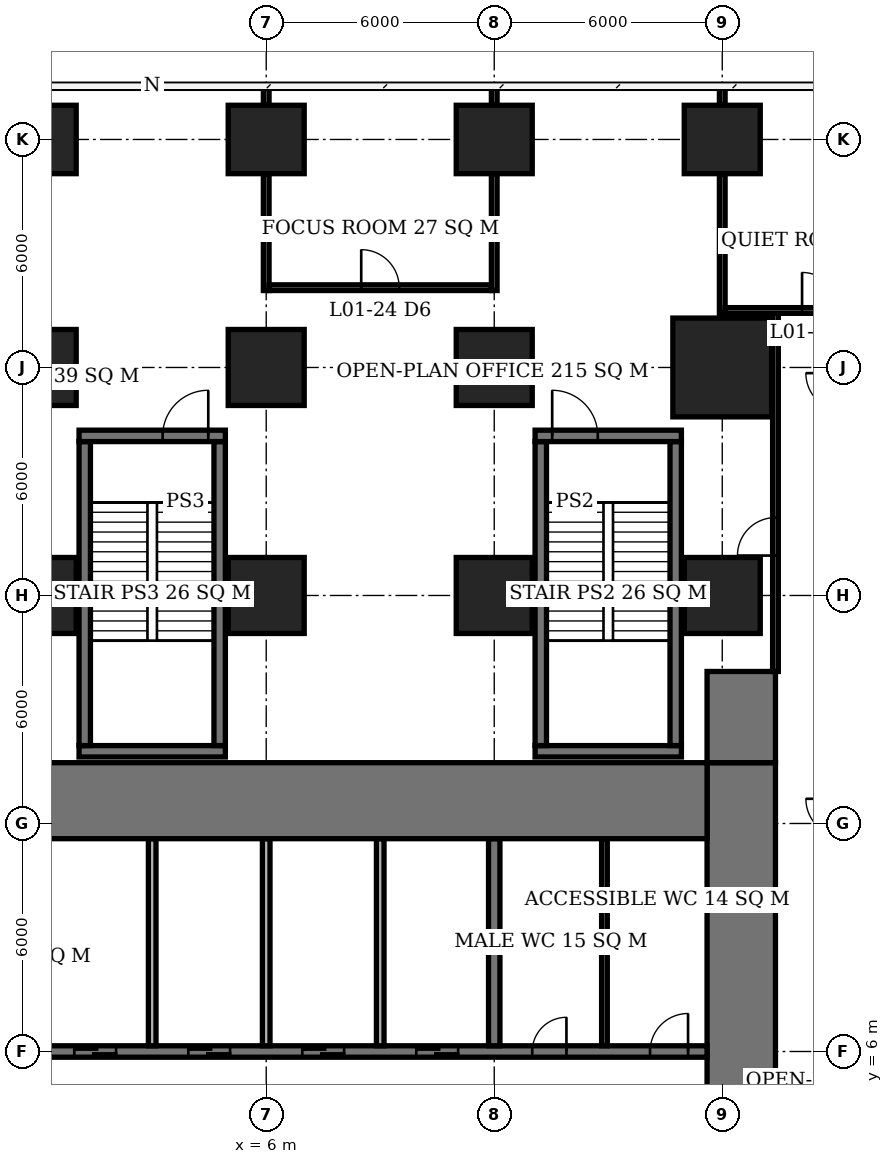
"""IFC4 building model, lengths in metres.
Left out: names, types, materials, properties, quantities, classifications, styles, units other than length and angle.
Written with IfcOpenShell. Run it as: python <this file> out.ifc"""

import sys

from ifc_helpers import new_model, si_unit, direction, frame, frame_2d, origin, origin_2d, place, context, subcontext, project, spatial, rectangle, extrude, element, fill, save


model = new_model("IFC4")
c1 = context("Model", 3, precision=1e-05, world=origin(), true_north=direction((0.0, 1.0)))
c2 = subcontext(c1, "Body", "Model", "MODEL_VIEW")
j1 = project(units=[si_unit("LENGTHUNIT", "METRE"), si_unit("PLANEANGLEUNIT", "RADIAN")], contexts=[c1])
p1 = place(None, origin())
s1 = spatial("IfcSite", under=j1, at=p1, CompositionType="ELEMENT")
p2 = place(p1, origin())
s2 = spatial("IfcBuilding", under=s1, at=p2, CompositionType="ELEMENT")
p3 = place(p2, frame((0.0, 0.0, 6.0)))
s3 = spatial("IfcBuildingStorey", under=s2, at=p3, CompositionType="ELEMENT", Elevation=6.0)
for number, where, z_axis, x_axis in (
    (1, (0.0, 18.0, 0.0), (0.0, 0.0, 1.0), (1.0, 0.0, 0.0)),
    (2, (0.0, 24.0, 0.0), (0.0, 0.0, 1.0), (1.0, 0.0, 0.0)),
):
    element("IfcColumn", number, at=place(p3, frame(where, z_axis=z_axis, x_axis=x_axis)), inside=s3, PredefinedType="COLUMN", context=c2, shape_type="SweptSolid", body=[
        extrude(rectangle(XDim=2.0, YDim=2.0, at=origin_2d()), origin(), (0.0, 0.0, 1.0), 5.0),
    ])
p4 = place(p3, frame((0.0, 30.0, 0.0), z_axis=(0.0, 0.0, 1.0), x_axis=(1.0, 0.0, 0.0)))
e3 = element("IfcColumn", 3, at=p4, inside=s3, PredefinedType="COLUMN", context=c2, shape_type="SweptSolid", body=[
    extrude(rectangle(XDim=2.0, YDim=1.8, at=origin_2d()), origin(), (0.0, 0.0, 1.0), 5.0),
])
for number, where, z_axis, x_axis in (
    (4, (6.0, 18.0, 0.0), (0.0, 0.0, 1.0), (1.0, 0.0, 0.0)),
    (5, (6.0, 24.0, 0.0), (0.0, 0.0, 1.0), (1.0, 0.0, 0.0)),
):
    element("IfcColumn", number, at=place(p3, frame(where, z_axis=z_axis, x_axis=x_axis)), inside=s3, PredefinedType="COLUMN", context=c2, shape_type="SweptSolid", body=[
        extrude(rectangle(XDim=2.0, YDim=2.0, at=origin_2d()), origin(), (0.0, 0.0, 1.0), 5.0),
    ])
p5 = place(p3, frame((6.0, 30.0, 0.0), z_axis=(0.0, 0.0, 1.0), x_axis=(1.0, 0.0, 0.0)))
e6 = element("IfcColumn", 6, at=p5, inside=s3, PredefinedType="COLUMN", context=c2, shape_type="SweptSolid", body=[
    extrude(rectangle(XDim=2.0, YDim=1.8, at=origin_2d()), origin(), (0.0, 0.0, 1.0), 5.0),
])
for number, where, z_axis, x_axis in (
    (7, (12.0, 18.0, 0.0), (0.0, 0.0, 1.0), (1.0, 0.0, 0.0)),
    (8, (12.0, 24.0, 0.0), (0.0, 0.0, 1.0), (1.0, 0.0, 0.0)),
):
    element("IfcColumn", number, at=place(p3, frame(where, z_axis=z_axis, x_axis=x_axis)), inside=s3, PredefinedType="COLUMN", context=c2, shape_type="SweptSolid", body=[
        extrude(rectangle(XDim=2.0, YDim=2.0, at=origin_2d()), origin(), (0.0, 0.0, 1.0), 5.0),
    ])
p6 = place(p3, frame((12.0, 30.0, 0.0), z_axis=(0.0, 0.0, 1.0), x_axis=(1.0, 0.0, 0.0)))
e9 = element("IfcColumn", 9, at=p6, inside=s3, PredefinedType="COLUMN", context=c2, shape_type="SweptSolid", body=[
    extrude(rectangle(XDim=2.0, YDim=1.8, at=origin_2d()), origin(), (0.0, 0.0, 1.0), 5.0),
])
p7 = place(p3, frame((18.0, 18.0, 0.0), z_axis=(0.0, 0.0, 1.0), x_axis=(1.0, 0.0, 0.0)))
e10 = element("IfcColumn", 10, at=p7, inside=s3, PredefinedType="COLUMN", context=c2, shape_type="SweptSolid", body=[
    extrude(rectangle(XDim=2.0, YDim=2.0, at=origin_2d()), origin(), (0.0, 0.0, 1.0), 5.0),
])
p8 = place(p3, frame((18.0, 24.0, 0.0), z_axis=(0.0, 0.0, 1.0), x_axis=(1.0, 0.0, 0.0)))
e11 = element("IfcColumn", 11, at=p8, inside=s3, PredefinedType="COLUMN", context=c2, shape_type="SweptSolid", body=[
    extrude(rectangle(XDim=2.6, YDim=2.6, at=origin_2d()), origin(), (0.0, 0.0, 1.0), 5.0),
])
p9 = place(p3, frame((18.0, 30.0, 0.0), z_axis=(0.0, 0.0, 1.0), x_axis=(1.0, 0.0, 0.0)))
e12 = element("IfcColumn", 12, at=p9, inside=s3, PredefinedType="COLUMN", context=c2, shape_type="SweptSolid", body=[
    extrude(rectangle(XDim=2.0, YDim=1.8, at=origin_2d()), origin(), (0.0, 0.0, 1.0), 5.0),
])
p10 = place(p3, frame((-5.6, 12.6, 0.0), z_axis=(0.0, 0.0, 1.0), x_axis=(1.0, 0.0, 0.0)))
e13 = element("IfcWall", 13, at=p10, inside=s3, PredefinedType="SHEAR", context=c2, shape_type="SweptSolid", body=[
    extrude(rectangle(XDim=23.2, YDim=2.0, at=frame_2d((11.6, 0.0))), origin(), (0.0, 0.0, 1.0), 5.0),
])
p11 = place(p3, frame((18.5, -7.6, 0.0), z_axis=(0.0, 0.0, 1.0), x_axis=(0.0, 1.0, 0.0)))
e14 = element("IfcWall", 14, at=p11, inside=s3, PredefinedType="SHEAR", context=c2, shape_type="SweptSolid", body=[
    extrude(rectangle(XDim=21.2, YDim=1.8, at=frame_2d((10.6, 0.0))), origin(), (0.0, 0.0, 1.0), 5.0),
])
p12 = place(p11, frame((9.2, 0.0, 0.0)))
e15 = element("IfcOpeningElement", 15, at=p12, cuts=e14, PredefinedType="OPENING", context=c2, shape_type="SweptSolid", body=[
    extrude(rectangle(XDim=1.8, YDim=2.4, at=frame_2d((0.9, 1.2))), frame((0.0, 0.91, 0.0), z_axis=(0.0, -1.0, 0.0), x_axis=(1.0, 0.0, 0.0)), (0.0, 0.0, 1.0), 1.82),
])
p13 = place(p3, frame((18.5, 13.6, 0.0), z_axis=(0.0, 0.0, 1.0), x_axis=(0.0, 1.0, 0.0)))
e16 = element("IfcWall", 16, at=p13, inside=s3, PredefinedType="SHEAR", context=c2, shape_type="SweptSolid", body=[
    extrude(rectangle(XDim=2.4, YDim=1.8, at=frame_2d((1.2, 0.0))), origin(), (0.0, 0.0, 1.0), 5.0),
])
p14 = place(p3, frame((-0.15, 6.0, 0.0), z_axis=(0.0, 0.0, 1.0), x_axis=(1.0, 0.0, 0.0)))
e17 = element("IfcWall", 17, at=p14, inside=s3, PredefinedType="SHEAR", context=c2, shape_type="SweptSolid", body=[
    extrude(rectangle(XDim=17.75, YDim=0.3, at=frame_2d((8.875, 0.0))), origin(), (0.0, 0.0, 1.0), 5.0),
])
p15 = place(p14, frame((13.15, 0.0, 0.0)))
e18 = element("IfcOpeningElement", 18, at=p15, cuts=e17, PredefinedType="OPENING", context=c2, shape_type="SweptSolid", body=[
    extrude(rectangle(XDim=0.9, YDim=2.1, at=frame_2d((0.45, 1.05))), frame((0.0, 0.16, 0.0), z_axis=(0.0, -1.0, 0.0), x_axis=(1.0, 0.0, 0.0)), (0.0, 0.0, 1.0), 0.32),
])
p16 = place(p14, frame((16.25, 0.0, 0.0)))
e19 = element("IfcOpeningElement", 19, at=p16, cuts=e17, PredefinedType="OPENING", context=c2, shape_type="SweptSolid", body=[
    extrude(rectangle(XDim=1.0, YDim=2.1, at=frame_2d((0.5, 1.05))), frame((0.0, 0.16, 0.0), z_axis=(0.0, -1.0, 0.0), x_axis=(1.0, 0.0, 0.0)), (0.0, 0.0, 1.0), 0.32),
])
p17 = place(p14, frame((1.1, 0.0, 0.0)))
e20 = element("IfcOpeningElement", 20, at=p17, cuts=e17, PredefinedType="OPENING", context=c2, shape_type="SweptSolid", body=[
    extrude(rectangle(XDim=1.1, YDim=2.1, at=frame_2d((0.55, 1.05))), frame((0.0, 0.16, 0.0), z_axis=(0.0, -1.0, 0.0), x_axis=(1.0, 0.0, 0.0)), (0.0, 0.0, 1.0), 0.32),
])
p18 = place(p14, frame((4.1, 0.0, 0.0)))
e21 = element("IfcOpeningElement", 21, at=p18, cuts=e17, PredefinedType="OPENING", context=c2, shape_type="SweptSolid", body=[
    extrude(rectangle(XDim=1.1, YDim=2.1, at=frame_2d((0.55, 1.05))), frame((0.0, 0.16, 0.0), z_axis=(0.0, -1.0, 0.0), x_axis=(1.0, 0.0, 0.0)), (0.0, 0.0, 1.0), 0.32),
])
p19 = place(p14, frame((7.1, 0.0, 0.0)))
e22 = element("IfcOpeningElement", 22, at=p19, cuts=e17, PredefinedType="OPENING", context=c2, shape_type="SweptSolid", body=[
    extrude(rectangle(XDim=1.1, YDim=2.1, at=frame_2d((0.55, 1.05))), frame((0.0, 0.16, 0.0), z_axis=(0.0, -1.0, 0.0), x_axis=(1.0, 0.0, 0.0)), (0.0, 0.0, 1.0), 0.32),
])
p20 = place(p14, frame((10.1, 0.0, 0.0)))
e23 = element("IfcOpeningElement", 23, at=p20, cuts=e17, PredefinedType="OPENING", context=c2, shape_type="SweptSolid", body=[
    extrude(rectangle(XDim=1.1, YDim=2.1, at=frame_2d((0.55, 1.05))), frame((0.0, 0.16, 0.0), z_axis=(0.0, -1.0, 0.0), x_axis=(1.0, 0.0, 0.0)), (0.0, 0.0, 1.0), 0.32),
])
p21 = place(p3, frame((12.0, 6.15, 0.0), z_axis=(0.0, 0.0, 1.0), x_axis=(0.0, 1.0, 0.0)))
e24 = element("IfcWall", 24, at=p21, inside=s3, PredefinedType="SHEAR", context=c2, shape_type="SweptSolid", body=[
    extrude(rectangle(XDim=5.45, YDim=0.3, at=frame_2d((2.725, 0.0))), origin(), (0.0, 0.0, 1.0), 5.0),
])
for number, where, z_axis, x_axis in (
    (25, (3.0, 6.15, 0.0), (0.0, 0.0, 1.0), (0.0, 1.0, 0.0)),
    (26, (6.0, 6.15, 0.0), (0.0, 0.0, 1.0), (0.0, 1.0, 0.0)),
    (27, (9.0, 6.15, 0.0), (0.0, 0.0, 1.0), (0.0, 1.0, 0.0)),
):
    element("IfcWall", number, at=place(p3, frame(where, z_axis=z_axis, x_axis=x_axis)), inside=s3, PredefinedType="SOLIDWALL", context=c2, shape_type="SweptSolid", body=[
        extrude(rectangle(XDim=5.45, YDim=0.2, at=frame_2d((2.725, 0.0))), origin(), (0.0, 0.0, 1.0), 5.0),
    ])
p22 = place(p3, frame((14.9, 6.15, 0.0), z_axis=(0.0, 0.0, 1.0), x_axis=(0.0, 1.0, 0.0)))
e28 = element("IfcWall", 28, at=p22, inside=s3, PredefinedType="PLUMBINGWALL", context=c2, shape_type="SweptSolid", body=[
    extrude(rectangle(XDim=5.45, YDim=0.15, at=frame_2d((2.725, 0.0))), origin(), (0.0, 0.0, 1.0), 4.75),
])
p23 = place(p3, frame((13.075, 13.9, 0.0), z_axis=(0.0, 0.0, 1.0), x_axis=(1.0, 0.0, 0.0)))
e29 = element("IfcWall", 29, at=p23, inside=s3, PredefinedType="SOLIDWALL", context=c2, shape_type="SweptSolid", body=[
    extrude(rectangle(XDim=3.85, YDim=0.3, at=frame_2d((1.925, 0.0))), origin(), (0.0, 0.0, 1.0), 4.75),
])
p24 = place(p3, frame((13.075, 22.2, 0.0), z_axis=(0.0, 0.0, 1.0), x_axis=(1.0, 0.0, 0.0)))
e30 = element("IfcWall", 30, at=p24, inside=s3, PredefinedType="SOLIDWALL", context=c2, shape_type="SweptSolid", body=[
    extrude(rectangle(XDim=3.85, YDim=0.3, at=frame_2d((1.925, 0.0))), origin(), (0.0, 0.0, 1.0), 4.75),
])
p25 = place(p24, frame((0.45, 0.0, 0.0)))
e31 = element("IfcOpeningElement", 31, at=p25, cuts=e30, PredefinedType="OPENING", context=c2, shape_type="SweptSolid", body=[
    extrude(rectangle(XDim=1.2, YDim=2.1, at=frame_2d((0.6, 1.05))), frame((0.0, 0.16, 0.0), z_axis=(0.0, -1.0, 0.0), x_axis=(1.0, 0.0, 0.0)), (0.0, 0.0, 1.0), 0.32),
])
for number, where, z_axis, x_axis in (
    (32, (13.225, 14.05, 0.0), (0.0, 0.0, 1.0), (0.0, 1.0, 0.0)),
    (33, (16.775, 14.05, 0.0), (0.0, 0.0, 1.0), (0.0, 1.0, 0.0)),
):
    element("IfcWall", number, at=place(p3, frame(where, z_axis=z_axis, x_axis=x_axis)), inside=s3, PredefinedType="SOLIDWALL", context=c2, shape_type="SweptSolid", body=[
        extrude(rectangle(XDim=8.0, YDim=0.3, at=frame_2d((4.0, 0.0))), origin(), (0.0, 0.0, 1.0), 4.75),
    ])
p26 = place(p3, frame((1.075, 13.9, 0.0), z_axis=(0.0, 0.0, 1.0), x_axis=(1.0, 0.0, 0.0)))
e34 = element("IfcWall", 34, at=p26, inside=s3, PredefinedType="SOLIDWALL", context=c2, shape_type="SweptSolid", body=[
    extrude(rectangle(XDim=3.85, YDim=0.3, at=frame_2d((1.925, 0.0))), origin(), (0.0, 0.0, 1.0), 4.75),
])
p27 = place(p3, frame((1.075, 22.2, 0.0), z_axis=(0.0, 0.0, 1.0), x_axis=(1.0, 0.0, 0.0)))
e35 = element("IfcWall", 35, at=p27, inside=s3, PredefinedType="SOLIDWALL", context=c2, shape_type="SweptSolid", body=[
    extrude(rectangle(XDim=3.85, YDim=0.3, at=frame_2d((1.925, 0.0))), origin(), (0.0, 0.0, 1.0), 4.75),
])
p28 = place(p27, frame((2.2, 0.0, 0.0)))
e36 = element("IfcOpeningElement", 36, at=p28, cuts=e35, PredefinedType="OPENING", context=c2, shape_type="SweptSolid", body=[
    extrude(rectangle(XDim=1.2, YDim=2.1, at=frame_2d((0.6, 1.05))), frame((0.0, 0.16, 0.0), z_axis=(0.0, -1.0, 0.0), x_axis=(1.0, 0.0, 0.0)), (0.0, 0.0, 1.0), 0.32),
])
for number, where, z_axis, x_axis in (
    (37, (1.225, 14.05, 0.0), (0.0, 0.0, 1.0), (0.0, 1.0, 0.0)),
    (38, (4.775, 14.05, 0.0), (0.0, 0.0, 1.0), (0.0, 1.0, 0.0)),
):
    element("IfcWall", number, at=place(p3, frame(where, z_axis=z_axis, x_axis=x_axis)), inside=s3, PredefinedType="SOLIDWALL", context=c2, shape_type="SweptSolid", body=[
        extrude(rectangle(XDim=8.0, YDim=0.3, at=frame_2d((4.0, 0.0))), origin(), (0.0, 0.0, 1.0), 4.75),
    ])
p29 = place(p3, frame((18.075, 25.5, 0.0), z_axis=(0.0, 0.0, 1.0), x_axis=(1.0, 0.0, 0.0)))
e39 = element("IfcWall", 39, at=p29, inside=s3, PredefinedType="PARTITIONING", context=c2, shape_type="SweptSolid", body=[
    extrude(rectangle(XDim=5.85, YDim=0.15, at=frame_2d((2.925, 0.0))), origin(), (0.0, 0.0, 1.0), 4.75),
])
p30 = place(p29, frame((2.025, 0.0, 0.0)))
e40 = element("IfcOpeningElement", 40, at=p30, cuts=e39, PredefinedType="OPENING", context=c2, shape_type="SweptSolid", body=[
    extrude(rectangle(XDim=1.0, YDim=2.1, at=frame_2d((0.5, 1.05))), frame((0.0, 0.085, 0.0), z_axis=(0.0, -1.0, 0.0), x_axis=(1.0, 0.0, 0.0)), (0.0, 0.0, 1.0), 0.17),
])
p31 = place(p3, frame((6.075, 26.1, 0.0), z_axis=(0.0, 0.0, 1.0), x_axis=(1.0, 0.0, 0.0)))
e41 = element("IfcWall", 41, at=p31, inside=s3, PredefinedType="PARTITIONING", context=c2, shape_type="SweptSolid", body=[
    extrude(rectangle(XDim=5.85, YDim=0.15, at=frame_2d((2.925, 0.0))), origin(), (0.0, 0.0, 1.0), 4.75),
])
p32 = place(p31, frame((2.425, 0.0, 0.0)))
e42 = element("IfcOpeningElement", 42, at=p32, cuts=e41, PredefinedType="OPENING", context=c2, shape_type="SweptSolid", body=[
    extrude(rectangle(XDim=1.0, YDim=2.1, at=frame_2d((0.5, 1.05))), frame((0.0, 0.085, 0.0), z_axis=(0.0, -1.0, 0.0), x_axis=(1.0, 0.0, 0.0)), (0.0, 0.0, 1.0), 0.17),
])
p33 = place(p3, frame((6.0, 26.025, 0.0), z_axis=(0.0, 0.0, 1.0), x_axis=(0.0, 1.0, 0.0)))
e43 = element("IfcWall", 43, at=p33, inside=s3, PredefinedType="PARTITIONING", context=c2, shape_type="SweptSolid", body=[
    extrude(rectangle(XDim=3.075, YDim=0.15, at=frame_2d((1.538, 0.0))), origin(), (0.0, 0.0, 1.0), 4.75),
])
p34 = place(p3, frame((6.0, 30.9, 0.0), z_axis=(0.0, 0.0, 1.0), x_axis=(0.0, 1.0, 0.0)))
e44 = element("IfcWall", 44, at=p34, inside=s3, PredefinedType="PARTITIONING", context=c2, shape_type="SweptSolid", body=[
    extrude(rectangle(XDim=0.45, YDim=0.15, at=frame_2d((0.225, 0.0))), origin(), (0.0, 0.0, 1.0), 4.75),
])
p35 = place(p3, frame((12.0, 26.025, 0.0), z_axis=(0.0, 0.0, 1.0), x_axis=(0.0, 1.0, 0.0)))
e45 = element("IfcWall", 45, at=p35, inside=s3, PredefinedType="PARTITIONING", context=c2, shape_type="SweptSolid", body=[
    extrude(rectangle(XDim=3.075, YDim=0.15, at=frame_2d((1.538, 0.0))), origin(), (0.0, 0.0, 1.0), 4.75),
])
p36 = place(p3, frame((12.0, 30.9, 0.0), z_axis=(0.0, 0.0, 1.0), x_axis=(0.0, 1.0, 0.0)))
e46 = element("IfcWall", 46, at=p36, inside=s3, PredefinedType="PARTITIONING", context=c2, shape_type="SweptSolid", body=[
    extrude(rectangle(XDim=0.475, YDim=0.15, at=frame_2d((0.238, 0.0))), origin(), (0.0, 0.0, 1.0), 4.75),
])
p37 = place(p3, frame((18.0, 25.425, 0.0), z_axis=(0.0, 0.0, 1.0), x_axis=(0.0, 1.0, 0.0)))
e47 = element("IfcWall", 47, at=p37, inside=s3, PredefinedType="PARTITIONING", context=c2, shape_type="SweptSolid", body=[
    extrude(rectangle(XDim=3.675, YDim=0.15, at=frame_2d((1.837, 0.0))), origin(), (0.0, 0.0, 1.0), 4.75),
])
p38 = place(p3, frame((18.0, 30.9, 0.0), z_axis=(0.0, 0.0, 1.0), x_axis=(0.0, 1.0, 0.0)))
e48 = element("IfcWall", 48, at=p38, inside=s3, PredefinedType="PARTITIONING", context=c2, shape_type="SweptSolid", body=[
    extrude(rectangle(XDim=0.475, YDim=0.15, at=frame_2d((0.238, 0.0))), origin(), (0.0, 0.0, 1.0), 4.75),
])
p39 = place(p3, frame((19.4, 16.0, 0.0), z_axis=(0.0, 0.0, 1.0), x_axis=(0.0, 1.0, 0.0)))
e49 = element("IfcWall", 49, at=p39, inside=s3, PredefinedType="PARTITIONING", context=c2, shape_type="SweptSolid", body=[
    extrude(rectangle(XDim=9.425, YDim=0.15, at=frame_2d((4.712, 0.0))), origin(), (0.0, 0.0, 1.0), 4.75),
])
p40 = place(p39, frame((3.05, 0.0, 0.0)))
e50 = element("IfcOpeningElement", 50, at=p40, cuts=e49, PredefinedType="OPENING", context=c2, shape_type="SweptSolid", body=[
    extrude(rectangle(XDim=1.0, YDim=2.1, at=frame_2d((0.5, 1.05))), frame((0.0, 0.085, 0.0), z_axis=(0.0, -1.0, 0.0), x_axis=(1.0, 0.0, 0.0)), (0.0, 0.0, 1.0), 0.17),
])
p41 = place(p15, origin())
e51 = element("IfcDoor", 51, at=p41, inside=s3, OperationType="SINGLE_SWING_RIGHT", PredefinedType="DOOR", context=c2, shape_type="SweptSolid", body=[
    extrude(rectangle(XDim=0.9, YDim=2.1, at=frame_2d((0.45, 1.05))), frame((0.0, 0.025, 0.0), z_axis=(0.0, -1.0, 0.0), x_axis=(1.0, 0.0, 0.0)), (0.0, 0.0, 1.0), 0.05),
])
fill(e18, e51)
p42 = place(p16, origin())
e52 = element("IfcDoor", 52, at=p42, inside=s3, OperationType="SINGLE_SWING_RIGHT", PredefinedType="DOOR", context=c2, shape_type="SweptSolid", body=[
    extrude(rectangle(XDim=1.0, YDim=2.1, at=frame_2d((0.5, 1.05))), frame((0.0, 0.025, 0.0), z_axis=(0.0, -1.0, 0.0), x_axis=(1.0, 0.0, 0.0)), (0.0, 0.0, 1.0), 0.05),
])
fill(e19, e52)
p43 = place(p17, origin())
e53 = element("IfcDoor", 53, at=p43, inside=s3, OperationType="DOUBLE_DOOR_SLIDING", PredefinedType="USERDEFINED", context=c2, shape_type="SweptSolid", body=[
    extrude(rectangle(XDim=1.1, YDim=2.1, at=frame_2d((0.55, 1.05))), frame((0.0, 0.025, 0.0), z_axis=(0.0, -1.0, 0.0), x_axis=(1.0, 0.0, 0.0)), (0.0, 0.0, 1.0), 0.05),
])
fill(e20, e53)
p44 = place(p18, origin())
e54 = element("IfcDoor", 54, at=p44, inside=s3, OperationType="DOUBLE_DOOR_SLIDING", PredefinedType="USERDEFINED", context=c2, shape_type="SweptSolid", body=[
    extrude(rectangle(XDim=1.1, YDim=2.1, at=frame_2d((0.55, 1.05))), frame((0.0, 0.025, 0.0), z_axis=(0.0, -1.0, 0.0), x_axis=(1.0, 0.0, 0.0)), (0.0, 0.0, 1.0), 0.05),
])
fill(e21, e54)
p45 = place(p19, origin())
e55 = element("IfcDoor", 55, at=p45, inside=s3, OperationType="DOUBLE_DOOR_SLIDING", PredefinedType="USERDEFINED", context=c2, shape_type="SweptSolid", body=[
    extrude(rectangle(XDim=1.1, YDim=2.1, at=frame_2d((0.55, 1.05))), frame((0.0, 0.025, 0.0), z_axis=(0.0, -1.0, 0.0), x_axis=(1.0, 0.0, 0.0)), (0.0, 0.0, 1.0), 0.05),
])
fill(e22, e55)
p46 = place(p20, origin())
e56 = element("IfcDoor", 56, at=p46, inside=s3, OperationType="DOUBLE_DOOR_SLIDING", PredefinedType="USERDEFINED", context=c2, shape_type="SweptSolid", body=[
    extrude(rectangle(XDim=1.1, YDim=2.1, at=frame_2d((0.55, 1.05))), frame((0.0, 0.025, 0.0), z_axis=(0.0, -1.0, 0.0), x_axis=(1.0, 0.0, 0.0)), (0.0, 0.0, 1.0), 0.05),
])
fill(e23, e56)
p47 = place(p25, origin())
e57 = element("IfcDoor", 57, at=p47, inside=s3, OperationType="SINGLE_SWING_LEFT", PredefinedType="DOOR", context=c2, shape_type="SweptSolid", body=[
    extrude(rectangle(XDim=1.2, YDim=2.1, at=frame_2d((0.6, 1.05))), frame((0.0, 0.025, 0.0), z_axis=(0.0, -1.0, 0.0), x_axis=(1.0, 0.0, 0.0)), (0.0, 0.0, 1.0), 0.05),
])
fill(e31, e57)
p48 = place(p28, origin())
e58 = element("IfcDoor", 58, at=p48, inside=s3, OperationType="SINGLE_SWING_RIGHT", PredefinedType="DOOR", context=c2, shape_type="SweptSolid", body=[
    extrude(rectangle(XDim=1.2, YDim=2.1, at=frame_2d((0.6, 1.05))), frame((0.0, 0.025, 0.0), z_axis=(0.0, -1.0, 0.0), x_axis=(1.0, 0.0, 0.0)), (0.0, 0.0, 1.0), 0.05),
])
fill(e36, e58)
p49 = place(p32, origin())
e59 = element("IfcDoor", 59, at=p49, inside=s3, OperationType="SINGLE_SWING_LEFT", PredefinedType="DOOR", context=c2, shape_type="SweptSolid", body=[
    extrude(rectangle(XDim=1.0, YDim=2.1, at=frame_2d((0.5, 1.05))), frame((0.0, 0.025, 0.0), z_axis=(0.0, -1.0, 0.0), x_axis=(1.0, 0.0, 0.0)), (0.0, 0.0, 1.0), 0.05),
])
fill(e42, e59)
p50 = place(p30, origin())
e60 = element("IfcDoor", 60, at=p50, inside=s3, OperationType="SINGLE_SWING_LEFT", PredefinedType="DOOR", context=c2, shape_type="SweptSolid", body=[
    extrude(rectangle(XDim=1.0, YDim=2.1, at=frame_2d((0.5, 1.05))), frame((0.0, 0.025, 0.0), z_axis=(0.0, -1.0, 0.0), x_axis=(1.0, 0.0, 0.0)), (0.0, 0.0, 1.0), 0.05),
])
fill(e40, e60)
p51 = place(p40, origin())
e61 = element("IfcDoor", 61, at=p51, inside=s3, OperationType="SINGLE_SWING_LEFT", PredefinedType="DOOR", context=c2, shape_type="SweptSolid", body=[
    extrude(rectangle(XDim=1.0, YDim=2.1, at=frame_2d((0.5, 1.05))), frame((0.0, 0.025, 0.0), z_axis=(0.0, -1.0, 0.0), x_axis=(1.0, 0.0, 0.0)), (0.0, 0.0, 1.0), 0.05),
])
fill(e50, e61)
save(model, sys.argv[1])
